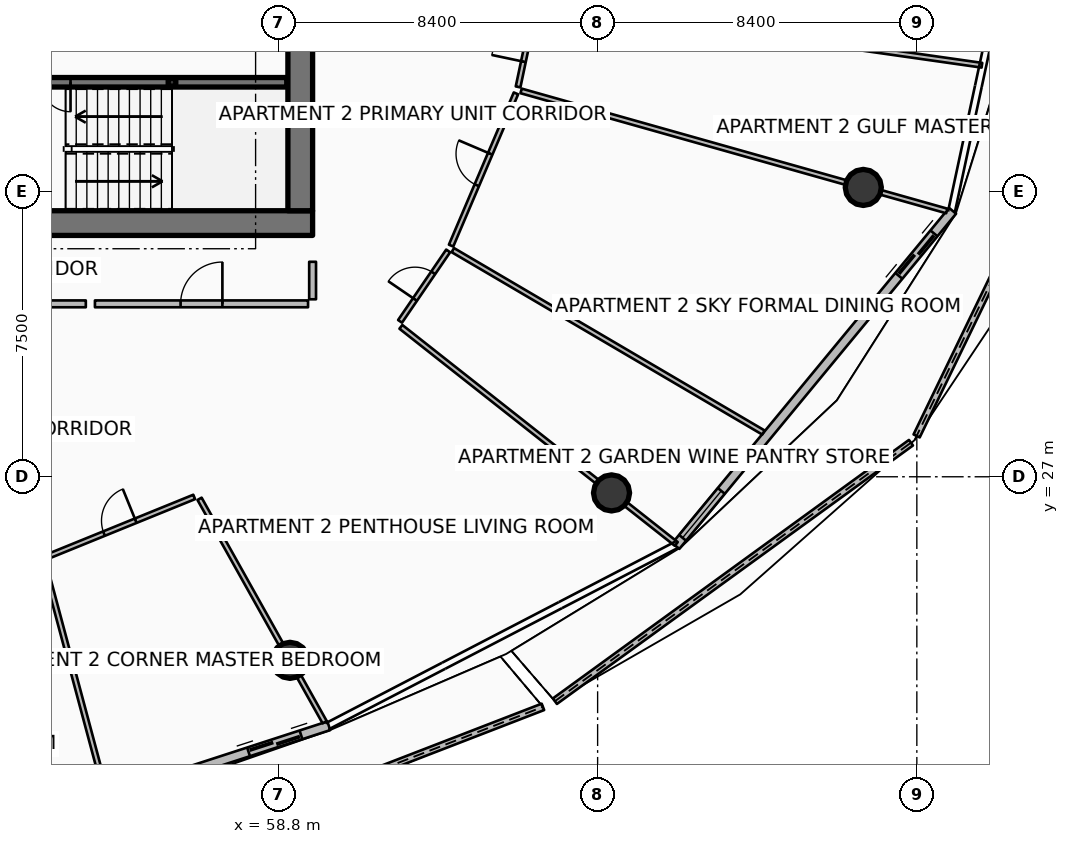
"""IFC4 building model, lengths in metres.
Left out: names, types, materials, properties, quantities, classifications, styles, units other than length and angle.
Written with IfcOpenShell. Run it as: python <this file> out.ifc"""

import sys

from ifc_helpers import new_model, si_unit, direction, frame, frame_2d, origin, origin_2d, place, context, subcontext, project, spatial, polyline, rectangle, hollow_rectangle, circle, outline, extrude, element, fill, save


model = new_model("IFC4")
c1 = context("Model", 3, precision=1e-05, world=origin(), true_north=direction((0.0, 1.0)))
c2 = subcontext(c1, "Body", "Model", "MODEL_VIEW")
j1 = project(units=[si_unit("LENGTHUNIT", "METRE"), si_unit("PLANEANGLEUNIT", "RADIAN")], contexts=[c1])
p1 = place(None, origin())
s1 = spatial("IfcSite", under=j1, at=p1, CompositionType="ELEMENT")
p2 = place(p1, origin())
s2 = spatial("IfcBuilding", under=s1, at=p2, CompositionType="ELEMENT")
p3 = place(p2, frame((0.0, 0.0, 244.4)))
s3 = spatial("IfcBuildingStorey", under=s2, at=p3, CompositionType="ELEMENT", Elevation=244.4)
p4 = place(p3, frame((49.95, 33.675, 0.0), z_axis=(0.0, 0.0, 1.0), x_axis=(1.0, 0.0, 0.0)))
e1 = element("IfcWall", 1, at=p4, inside=s3, PredefinedType="SHEAR", context=c2, shape_type="SweptSolid", body=[
    extrude(rectangle(XDim=9.75, YDim=0.65, at=frame_2d((4.875, 0.0))), origin(), (0.0, 0.0, 1.0), 3.85),
])
p5 = place(p3, frame((59.375, 34.0, 0.0), z_axis=(0.0, 0.0, 1.0), x_axis=(0.0, 1.0, 0.0)))
e2 = element("IfcWall", 2, at=p5, inside=s3, PredefinedType="SHEAR", context=c2, shape_type="SweptSolid", body=[
    extrude(rectangle(XDim=16.0, YDim=0.65, at=frame_2d((8.0, 0.0))), origin(), (0.0, 0.0, 1.0), 3.85),
])
p6 = place(p3, frame((56.0, 37.38, 0.0), z_axis=(0.0, 0.0, 1.0), x_axis=(1.0, 0.0, 0.0)))
e3 = element("IfcColumn", 3, at=p6, inside=s3, PredefinedType="COLUMN", context=c2, shape_type="SweptSolid", body=[
    extrude(hollow_rectangle(XDim=0.2, YDim=0.2, WallThickness=0.01, InnerFilletRadius=0.01, OuterFilletRadius=0.02, at=origin_2d()), origin(), (0.0, 0.0, 1.0), 1.72),
])
for number, where, z_axis, x_axis in (
    (4, (59.105, 22.17, 0.0), (0.0, 0.0, 1.0), (1.0, 0.0, 0.0)),
    (5, (67.566, 26.575, 0.0), (0.0, 0.0, 1.0), (1.0, 0.0, 0.0)),
    (6, (74.191, 34.613, 0.0), (0.0, 0.0, 1.0), (1.0, 0.0, 0.0)),
):
    element("IfcColumn", number, at=place(p3, frame(where, z_axis=z_axis, x_axis=x_axis)), inside=s3, PredefinedType="COLUMN", context=c2, shape_type="SweptSolid", body=[
        extrude(circle(Radius=0.475, at=origin_2d()), origin(), (0.0, 0.0, 1.0), 3.59),
    ])
p7 = place(p3, frame((56.172, 17.238, 0.0), z_axis=(0.0, 0.0, 1.0), x_axis=(0.9326848715, 0.36069229334, 0.0)))
e7 = element("IfcWall", 7, at=p7, inside=s3, PredefinedType="PARAPET", context=c2, shape_type="SweptSolid", body=[
    extrude(outline(polyline([(0.0, 0.0), (10.281, 0.0), (10.281, 1.224), (5.14, 1.127), (0.0, 1.148), (0.0, 0.0)])), frame((0.0, 0.09, 0.0), z_axis=(0.0, -1.0, 0.0), x_axis=(1.0, 0.0, 0.0)), (0.0, 0.0, 1.0), 0.18),
])
p8 = place(p3, frame((66.076, 21.095, 0.0), z_axis=(0.0, 0.0, 1.0), x_axis=(0.809261043527, 0.587449200722, 0.0)))
e8 = element("IfcWall", 8, at=p8, inside=s3, PredefinedType="PARAPET", context=c2, shape_type="SweptSolid", body=[
    extrude(outline(polyline([(0.0, 0.0), (11.577, 0.0), (11.577, 1.632), (5.788, 1.418), (0.0, 1.233), (0.0, 0.0)])), frame((0.0, 0.09, 0.0), z_axis=(0.0, -1.0, 0.0), x_axis=(1.0, 0.0, 0.0)), (0.0, 0.0, 1.0), 0.18),
])
p9 = place(p3, frame((75.594, 28.075, 0.0), z_axis=(0.0, 0.0, 1.0), x_axis=(0.435762237374, 0.900061815921, 0.0)))
e9 = element("IfcWall", 9, at=p9, inside=s3, PredefinedType="PARAPET", context=c2, shape_type="SweptSolid", body=[
    extrude(outline(polyline([(0.0, 0.0), (12.362, 0.0), (12.362, 1.86), (6.181, 1.798), (0.0, 1.632), (0.0, 0.0)])), frame((0.0, 0.09, 0.0), z_axis=(0.0, -1.0, 0.0), x_axis=(1.0, 0.0, 0.0)), (0.0, 0.0, 1.0), 0.18),
])
p10 = place(p3, frame((50.858, 17.436, 0.0), z_axis=(0.0, 0.0, 1.0), x_axis=(0.951055974609, 0.309018661507, 0.0)))
e10 = element("IfcWall", 10, at=p10, inside=s3, PredefinedType="SOLIDWALL", context=c2, shape_type="SweptSolid", body=[
    extrude(rectangle(XDim=9.745, YDim=0.24, at=frame_2d((4.873, 0.0))), origin(), (0.0, 0.0, 1.0), 2.54),
])
p11 = place(p10, frame((7.525, 0.0, 0.0)))
e11 = element("IfcOpeningElement", 11, at=p11, cuts=e10, PredefinedType="OPENING", context=c2, shape_type="SweptSolid", body=[
    extrude(rectangle(XDim=1.45, YDim=2.15, at=frame_2d((0.725, 1.075))), frame((0.0, 0.13, 0.0), z_axis=(0.0, -1.0, 0.0), x_axis=(1.0, 0.0, 0.0)), (0.0, 0.0, 1.0), 0.26),
])
p12 = place(p10, frame((0.28, 0.0, 0.65)))
e12 = element("IfcOpeningElement", 12, at=p12, cuts=e10, PredefinedType="OPENING", context=c2, shape_type="SweptSolid", body=[
    extrude(rectangle(XDim=1.6, YDim=1.5, at=frame_2d((0.8, 0.75))), frame((0.0, 0.13, 0.0), z_axis=(0.0, -1.0, 0.0), x_axis=(1.0, 0.0, 0.0)), (0.0, 0.0, 1.0), 0.26),
])
p13 = place(p3, frame((69.258, 25.178, 0.0), z_axis=(0.0, 0.0, 1.0), x_axis=(0.636680093065, 0.771128043255, 0.0)))
e13 = element("IfcWall", 13, at=p13, inside=s3, PredefinedType="SOLIDWALL", context=c2, shape_type="SweptSolid", body=[
    extrude(rectangle(XDim=11.438, YDim=0.24, at=frame_2d((5.719, 0.0))), origin(), (0.0, 0.0, 1.0), 2.54),
])
p14 = place(p13, frame((9.218, 0.0, 0.0)))
e14 = element("IfcOpeningElement", 14, at=p14, cuts=e13, PredefinedType="OPENING", context=c2, shape_type="SweptSolid", body=[
    extrude(rectangle(XDim=1.45, YDim=2.15, at=frame_2d((0.725, 1.075))), frame((0.0, 0.13, 0.0), z_axis=(0.0, -1.0, 0.0), x_axis=(1.0, 0.0, 0.0)), (0.0, 0.0, 1.0), 0.26),
])
p15 = place(p13, frame((0.28, 0.0, 0.65)))
e15 = element("IfcOpeningElement", 15, at=p15, cuts=e13, PredefinedType="OPENING", context=c2, shape_type="SweptSolid", body=[
    extrude(rectangle(XDim=1.6, YDim=1.5, at=frame_2d((0.8, 0.75))), frame((0.0, 0.13, 0.0), z_axis=(0.0, -1.0, 0.0), x_axis=(1.0, 0.0, 0.0)), (0.0, 0.0, 1.0), 0.26),
])
p16 = place(p3, frame((51.48, 37.38, 0.0), z_axis=(0.0, 0.0, 1.0), x_axis=(1.0, 0.0, 0.0)))
e16 = element("IfcWall", 16, at=p16, inside=s3, PredefinedType="SOLIDWALL", context=c2, shape_type="SweptSolid", body=[
    extrude(rectangle(XDim=7.54, YDim=0.25, at=frame_2d((3.77, 0.0))), origin(), (0.0, 0.0, 1.0), 3.59),
])
p17 = place(p16, frame((0.3, 0.0, 0.0)))
e17 = element("IfcOpeningElement", 17, at=p17, cuts=e16, PredefinedType="OPENING", context=c2, shape_type="SweptSolid", body=[
    extrude(rectangle(XDim=1.55, YDim=2.15, at=frame_2d((0.775, 1.075))), frame((0.0, 0.135, 0.0), z_axis=(0.0, -1.0, 0.0), x_axis=(1.0, 0.0, 0.0)), (0.0, 0.0, 1.0), 0.27),
])
p18 = place(p3, frame((53.972, 31.55, 0.0), z_axis=(0.0, 0.0, 1.0), x_axis=(1.0, 0.0, 0.0)))
e18 = element("IfcWall", 18, at=p18, inside=s3, PredefinedType="PARTITIONING", context=c2, shape_type="SweptSolid", body=[
    extrude(rectangle(XDim=5.608, YDim=0.18, at=frame_2d((2.804, 0.0))), origin(), (0.0, 0.0, 1.0), 2.957),
])
p19 = place(p18, frame((2.254, 0.0, 0.0)))
e19 = element("IfcOpeningElement", 19, at=p19, cuts=e18, PredefinedType="OPENING", context=c2, shape_type="SweptSolid", body=[
    extrude(rectangle(XDim=1.1, YDim=2.1, at=frame_2d((0.55, 1.05))), frame((0.0, 0.1, 0.0), z_axis=(0.0, -1.0, 0.0), x_axis=(1.0, 0.0, 0.0)), (0.0, 0.0, 1.0), 0.2),
])
p20 = place(p3, frame((59.7, 31.67, 0.0), z_axis=(0.0, 0.0, 1.0), x_axis=(0.0, 1.0, 0.0)))
e20 = element("IfcWall", 20, at=p20, inside=s3, PredefinedType="PARTITIONING", context=c2, shape_type="SweptSolid", body=[
    extrude(rectangle(XDim=0.987, YDim=0.18, at=frame_2d((0.493, 0.0))), origin(), (0.0, 0.0, 1.0), 2.957),
])
p21 = place(p3, frame((49.357, 31.55, 0.0), z_axis=(0.0, 0.0, 1.0), x_axis=(1.0, 0.0, 0.0)))
e21 = element("IfcWall", 21, at=p21, inside=s3, PredefinedType="PARTITIONING", context=c2, shape_type="SweptSolid", body=[
    extrude(rectangle(XDim=4.376, YDim=0.18, at=frame_2d((2.188, 0.0))), origin(), (0.0, 0.0, 1.0), 2.957),
])
p22 = place(p3, frame((56.725, 26.42, 0.0), z_axis=(0.0, 0.0, 1.0), x_axis=(0.488624332812, -0.872494275846, 0.0)))
e22 = element("IfcWall", 22, at=p22, inside=s3, PredefinedType="PARTITIONING", context=c2, shape_type="SweptSolid", body=[
    extrude(rectangle(XDim=6.738, YDim=0.125, at=frame_2d((3.369, 0.0))), origin(), (0.0, 0.0, 1.0), 2.957),
])
p23 = place(p3, frame((52.621, 24.762, 0.0), z_axis=(0.0, 0.0, 1.0), x_axis=(0.258970884365, -0.96588512829, 0.0)))
e23 = element("IfcWall", 23, at=p23, inside=s3, PredefinedType="PARTITIONING", context=c2, shape_type="SweptSolid", body=[
    extrude(rectangle(XDim=6.306, YDim=0.125, at=frame_2d((3.153, 0.0))), origin(), (0.0, 0.0, 1.0), 3.03),
])
p24 = place(p3, frame((52.672, 24.879, 0.0), z_axis=(0.0, 0.0, 1.0), x_axis=(0.926344303187, 0.376677888857, 0.0)))
e24 = element("IfcWall", 24, at=p24, inside=s3, PredefinedType="PARTITIONING", context=c2, shape_type="SweptSolid", body=[
    extrude(rectangle(XDim=4.223, YDim=0.125, at=frame_2d((2.111, 0.0))), origin(), (0.0, 0.0, 1.0), 2.957),
])
p25 = place(p24, frame((1.661, 0.0, 0.0)))
e25 = element("IfcOpeningElement", 25, at=p25, cuts=e24, PredefinedType="OPENING", context=c2, shape_type="SweptSolid", body=[
    extrude(rectangle(XDim=0.9, YDim=2.08, at=frame_2d((0.45, 1.04))), frame((0.0, 0.073, 0.0), z_axis=(0.0, -1.0, 0.0), x_axis=(1.0, 0.0, 0.0)), (0.0, 0.0, 1.0), 0.145),
])
p26 = place(p3, frame((62.023, 30.945, 0.0), z_axis=(0.0, 0.0, 1.0), x_axis=(0.785322102606, -0.619087388952, 0.0)))
e26 = element("IfcWall", 26, at=p26, inside=s3, PredefinedType="PARTITIONING", context=c2, shape_type="SweptSolid", body=[
    extrude(rectangle(XDim=9.228, YDim=0.125, at=frame_2d((4.614, 0.0))), origin(), (0.0, 0.0, 1.0), 2.957),
])
p27 = place(p3, frame((63.39, 32.963, 0.0), z_axis=(0.0, 0.0, 1.0), x_axis=(0.862331921897, -0.506343417532, 0.0)))
e27 = element("IfcWall", 27, at=p27, inside=s3, PredefinedType="PARTITIONING", context=c2, shape_type="SweptSolid", body=[
    extrude(rectangle(XDim=9.478, YDim=0.125, at=frame_2d((4.739, 0.0))), origin(), (0.0, 0.0, 1.0), 3.03),
])
p28 = place(p3, frame((62.001, 31.089, 0.0), z_axis=(0.0, 0.0, 1.0), x_axis=(0.564052095913, 0.825739204044, 0.0)))
e28 = element("IfcWall", 28, at=p28, inside=s3, PredefinedType="PARTITIONING", context=c2, shape_type="SweptSolid", body=[
    extrude(rectangle(XDim=2.245, YDim=0.125, at=frame_2d((1.122, 0.0))), origin(), (0.0, 0.0, 1.0), 2.957),
])
p29 = place(p28, frame((0.698, 0.0, 0.0)))
e29 = element("IfcOpeningElement", 29, at=p29, cuts=e28, PredefinedType="OPENING", context=c2, shape_type="SweptSolid", body=[
    extrude(rectangle(XDim=0.85, YDim=2.06, at=frame_2d((0.425, 1.03))), frame((0.0, 0.073, 0.0), z_axis=(0.0, -1.0, 0.0), x_axis=(1.0, 0.0, 0.0)), (0.0, 0.0, 1.0), 0.145),
])
p30 = place(p3, frame((63.344, 33.083, 0.0), z_axis=(0.0, 0.0, 1.0), x_axis=(0.392064212371, 0.919937852998, 0.0)))
e30 = element("IfcWall", 30, at=p30, inside=s3, PredefinedType="PARTITIONING", context=c2, shape_type="SweptSolid", body=[
    extrude(rectangle(XDim=4.354, YDim=0.125, at=frame_2d((2.177, 0.0))), origin(), (0.0, 0.0, 1.0), 2.957),
])
p31 = place(p30, frame((1.727, 0.0, 0.0)))
e31 = element("IfcOpeningElement", 31, at=p31, cuts=e30, PredefinedType="OPENING", context=c2, shape_type="SweptSolid", body=[
    extrude(rectangle(XDim=0.9, YDim=2.08, at=frame_2d((0.45, 1.04))), frame((0.0, 0.073, 0.0), z_axis=(0.0, -1.0, 0.0), x_axis=(1.0, 0.0, 0.0)), (0.0, 0.0, 1.0), 0.145),
])
p32 = place(p3, frame((65.187, 37.153, 0.0), z_axis=(0.0, 0.0, 1.0), x_axis=(0.962455577867, -0.271439239301, 0.0)))
e32 = element("IfcWall", 32, at=p32, inside=s3, PredefinedType="PARTITIONING", context=c2, shape_type="SweptSolid", body=[
    extrude(rectangle(XDim=11.639, YDim=0.125, at=frame_2d((5.819, 0.0))), origin(), (0.0, 0.0, 1.0), 2.957),
])
p33 = place(p3, frame((65.669, 39.485, 0.0), z_axis=(0.0, 0.0, 1.0), x_axis=(0.990022432034, -0.140909843761, 0.0)))
e33 = element("IfcWall", 33, at=p33, inside=s3, PredefinedType="PARTITIONING", context=c2, shape_type="SweptSolid", body=[
    extrude(rectangle(XDim=11.761, YDim=0.125, at=frame_2d((5.88, 0.0))), origin(), (0.0, 0.0, 1.0), 3.03),
])
p34 = place(p3, frame((65.107, 37.258, 0.0), z_axis=(0.0, 0.0, 1.0), x_axis=(0.20677346991, 0.978388845062, 0.0)))
e34 = element("IfcWall", 34, at=p34, inside=s3, PredefinedType="PARTITIONING", context=c2, shape_type="SweptSolid", body=[
    extrude(rectangle(XDim=2.209, YDim=0.125, at=frame_2d((1.104, 0.0))), origin(), (0.0, 0.0, 1.0), 2.957),
])
p35 = place(p34, frame((0.68, 0.0, 0.0)))
e35 = element("IfcOpeningElement", 35, at=p35, cuts=e34, PredefinedType="OPENING", context=c2, shape_type="SweptSolid", body=[
    extrude(rectangle(XDim=0.85, YDim=2.06, at=frame_2d((0.425, 1.03))), frame((0.0, 0.073, 0.0), z_axis=(0.0, -1.0, 0.0), x_axis=(1.0, 0.0, 0.0)), (0.0, 0.0, 1.0), 0.145),
])
p36 = place(p11, origin())
e36 = element("IfcDoor", 36, at=p36, inside=s3, OperationType="DOUBLE_DOOR_SLIDING", PredefinedType="DOOR", context=c2, shape_type="SweptSolid", body=[
    extrude(rectangle(XDim=1.45, YDim=2.15, at=frame_2d((0.725, 1.075))), frame((0.0, 0.025, 0.0), z_axis=(0.0, -1.0, 0.0), x_axis=(1.0, 0.0, 0.0)), (0.0, 0.0, 1.0), 0.05),
])
fill(e11, e36)
p37 = place(p14, origin())
e37 = element("IfcDoor", 37, at=p37, inside=s3, OperationType="DOUBLE_DOOR_SLIDING", PredefinedType="DOOR", context=c2, shape_type="SweptSolid", body=[
    extrude(rectangle(XDim=1.45, YDim=2.15, at=frame_2d((0.725, 1.075))), frame((0.0, 0.025, 0.0), z_axis=(0.0, -1.0, 0.0), x_axis=(1.0, 0.0, 0.0)), (0.0, 0.0, 1.0), 0.05),
])
fill(e14, e37)
p38 = place(p15, origin())
e38 = element("IfcWindow", 38, at=p38, inside=s3, PartitioningType="SINGLE_PANEL", PredefinedType="WINDOW", context=c2, shape_type="SweptSolid", body=[
    extrude(rectangle(XDim=1.6, YDim=1.5, at=frame_2d((0.8, 0.75))), frame((0.0, 0.03, 0.0), z_axis=(0.0, -1.0, 0.0), x_axis=(1.0, 0.0, 0.0)), (0.0, 0.0, 1.0), 0.06),
])
fill(e15, e38)
p39 = place(p17, origin())
e39 = element("IfcDoor", 39, at=p39, inside=s3, OperationType="DOUBLE_DOOR_SINGLE_SWING", PredefinedType="DOOR", context=c2, shape_type="SweptSolid", body=[
    extrude(rectangle(XDim=1.55, YDim=2.15, at=frame_2d((0.775, 1.075))), frame((0.0, 0.025, 0.0), z_axis=(0.0, -1.0, 0.0), x_axis=(1.0, 0.0, 0.0)), (0.0, 0.0, 1.0), 0.05),
])
fill(e17, e39)
p40 = place(p19, origin())
e40 = element("IfcDoor", 40, at=p40, inside=s3, OperationType="SINGLE_SWING_RIGHT", PredefinedType="DOOR", context=c2, shape_type="SweptSolid", body=[
    extrude(rectangle(XDim=1.1, YDim=2.1, at=frame_2d((0.55, 1.05))), frame((0.0, 0.025, 0.0), z_axis=(0.0, -1.0, 0.0), x_axis=(1.0, 0.0, 0.0)), (0.0, 0.0, 1.0), 0.05),
])
fill(e19, e40)
p41 = place(p25, origin())
e41 = element("IfcDoor", 41, at=p41, inside=s3, OperationType="SINGLE_SWING_RIGHT", PredefinedType="DOOR", context=c2, shape_type="SweptSolid", body=[
    extrude(rectangle(XDim=0.9, YDim=2.08, at=frame_2d((0.45, 1.04))), frame((0.0, 0.025, 0.0), z_axis=(0.0, -1.0, 0.0), x_axis=(1.0, 0.0, 0.0)), (0.0, 0.0, 1.0), 0.05),
])
fill(e25, e41)
p42 = place(p29, origin())
e42 = element("IfcDoor", 42, at=p42, inside=s3, OperationType="SINGLE_SWING_LEFT", PredefinedType="DOOR", context=c2, shape_type="SweptSolid", body=[
    extrude(rectangle(XDim=0.85, YDim=2.06, at=frame_2d((0.425, 1.03))), frame((0.0, 0.025, 0.0), z_axis=(0.0, -1.0, 0.0), x_axis=(1.0, 0.0, 0.0)), (0.0, 0.0, 1.0), 0.05),
])
fill(e29, e42)
p43 = place(p31, origin())
e43 = element("IfcDoor", 43, at=p43, inside=s3, OperationType="SINGLE_SWING_RIGHT", PredefinedType="DOOR", context=c2, shape_type="SweptSolid", body=[
    extrude(rectangle(XDim=0.9, YDim=2.08, at=frame_2d((0.45, 1.04))), frame((0.0, 0.025, 0.0), z_axis=(0.0, -1.0, 0.0), x_axis=(1.0, 0.0, 0.0)), (0.0, 0.0, 1.0), 0.05),
])
fill(e31, e43)
p44 = place(p35, origin())
e44 = element("IfcDoor", 44, at=p44, inside=s3, OperationType="SINGLE_SWING_LEFT", PredefinedType="DOOR", context=c2, shape_type="SweptSolid", body=[
    extrude(rectangle(XDim=0.85, YDim=2.06, at=frame_2d((0.425, 1.03))), frame((0.0, 0.025, 0.0), z_axis=(0.0, -1.0, 0.0), x_axis=(1.0, 0.0, 0.0)), (0.0, 0.0, 1.0), 0.05),
])
fill(e35, e44)
save(model, sys.argv[1])
